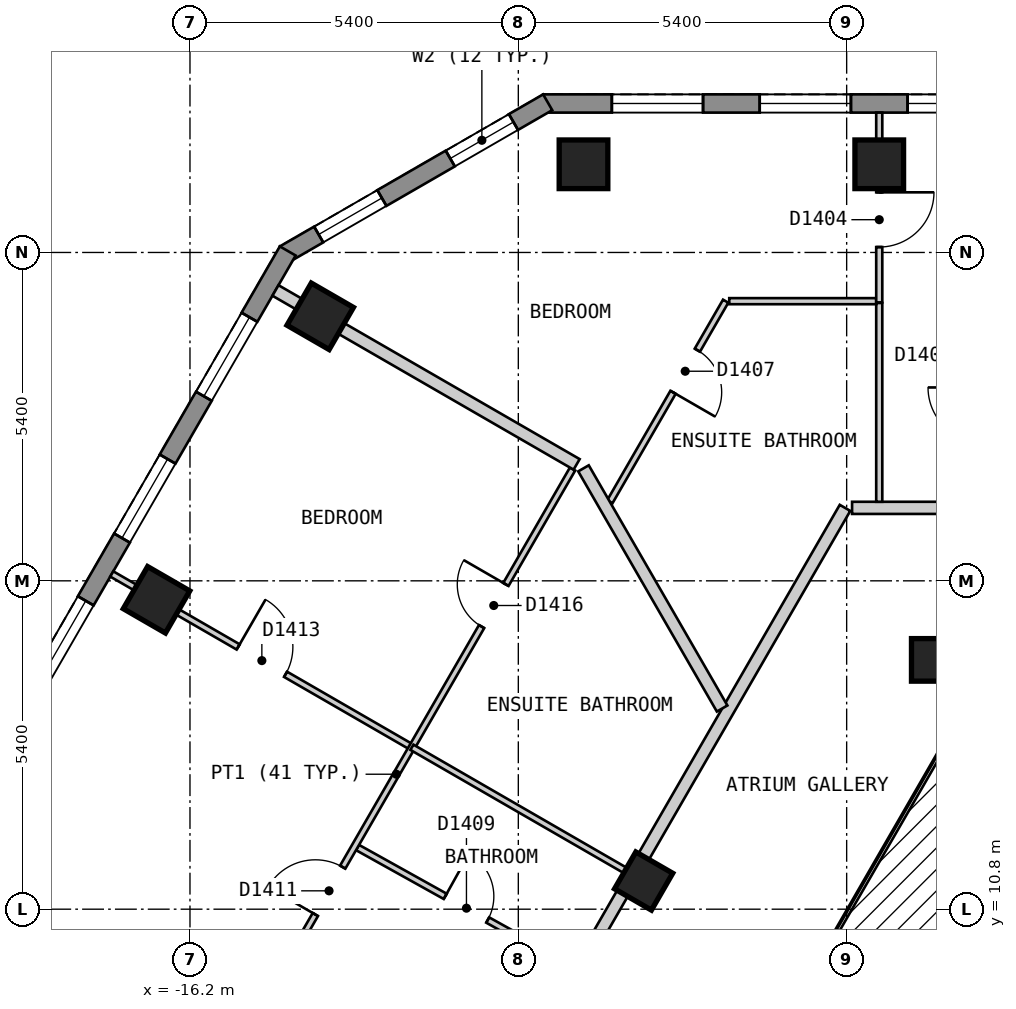
"""IFC4 building model, lengths in metres.
Left out: names, types, materials, properties, quantities, classifications, styles, units other than length and angle.
Written with IfcOpenShell. Run it as: python <this file> out.ifc"""

import sys

from ifc_helpers import new_model, si_unit, direction, frame, frame_2d, origin, origin_2d, place, context, subcontext, project, spatial, polyline, rectangle, outline, extrude, element, fill, save


model = new_model("IFC4")
c1 = context("Model", 3, precision=1e-05, world=origin(), true_north=direction((0.0, 1.0)))
c2 = subcontext(c1, "Body", "Model", "MODEL_VIEW")
j1 = project(units=[si_unit("LENGTHUNIT", "METRE"), si_unit("PLANEANGLEUNIT", "RADIAN")], contexts=[c1])
p1 = place(None, origin())
s1 = spatial("IfcSite", under=j1, at=p1, CompositionType="ELEMENT")
p2 = place(p1, origin())
s2 = spatial("IfcBuilding", under=s1, at=p2, CompositionType="ELEMENT")
p3 = place(p2, frame((0.0, 0.0, 178.2)))
s3 = spatial("IfcBuildingStorey", under=s2, at=p3, CompositionType="ELEMENT", Elevation=178.2)
for number, where, z_axis, x_axis in (
    (1, (-4.864, 23.05, 0.0), (0.0, 0.0, 1.0), (-1.0, 0.0, 0.0)),
    (2, (-9.728, 23.05, 0.0), (0.0, 0.0, 1.0), (-1.0, 0.0, 0.0)),
    (3, (-14.058, 20.55, 0.0), (0.0, 0.0, 1.0), (-0.5, -0.866, 0.0)),
    (4, (-16.75, 15.888, 0.0), (0.0, 0.0, 1.0), (-0.5, -0.866, 0.0)),
):
    element("IfcColumn", number, at=place(p3, frame(where, z_axis=z_axis, x_axis=x_axis)), inside=s3, PredefinedType="COLUMN", context=c2, shape_type="SweptSolid", body=[
        extrude(rectangle(XDim=0.8, YDim=0.8, at=origin_2d()), origin(), (0.0, 0.0, 1.0), 3.0),
    ])
for number, where, z_axis, x_axis in (
    (5, (-3.984, 14.9, 0.0), (0.0, 0.0, 1.0), (1.0, 0.0, 0.0)),
    (6, (-8.739, 11.263, 0.0), (0.0, 0.0, 1.0), (-0.5, -0.866, 0.0)),
):
    element("IfcColumn", number, at=place(p3, frame(where, z_axis=z_axis, x_axis=x_axis)), inside=s3, PredefinedType="COLUMN", context=c2, shape_type="SweptSolid", body=[
        extrude(rectangle(XDim=0.7, YDim=0.7, at=origin_2d()), origin(), (0.0, 0.0, 1.0), 3.0),
    ])
p4 = place(p3, frame((10.392, 24.05, 0.0), z_axis=(0.0, 0.0, 1.0), x_axis=(-1.0, 0.0, 0.0)))
e7 = element("IfcWall", 7, at=p4, inside=s3, PredefinedType="SOLIDWALL", context=c2, shape_type="SweptSolid", body=[
    extrude(outline(polyline([(0.0, -0.15), (20.784, -0.15), (20.704, 0.15), (0.08, 0.15), (0.0, -0.15)])), origin(), (0.0, 0.0, 1.0), 2.7),
])
p5 = place(p4, frame((1.13, 0.0, 0.15)))
e8 = element("IfcOpeningElement", 8, at=p5, cuts=e7, PredefinedType="OPENING", context=c2, shape_type="SweptSolid", body=[
    extrude(rectangle(XDim=1.5, YDim=2.1, at=frame_2d((0.75, 1.05))), frame((0.0, 0.16, 0.0), z_axis=(0.0, -1.0, 0.0), x_axis=(1.0, 0.0, 0.0)), (0.0, 0.0, 1.0), 0.32),
])
p6 = place(p4, frame((3.562, 0.0, 0.15)))
e9 = element("IfcOpeningElement", 9, at=p6, cuts=e7, PredefinedType="OPENING", context=c2, shape_type="SweptSolid", body=[
    extrude(rectangle(XDim=1.5, YDim=2.1, at=frame_2d((0.75, 1.05))), frame((0.0, 0.16, 0.0), z_axis=(0.0, -1.0, 0.0), x_axis=(1.0, 0.0, 0.0)), (0.0, 0.0, 1.0), 0.32),
])
p7 = place(p4, frame((5.994, 0.0, 0.15)))
e10 = element("IfcOpeningElement", 10, at=p7, cuts=e7, PredefinedType="OPENING", context=c2, shape_type="SweptSolid", body=[
    extrude(rectangle(XDim=1.5, YDim=2.1, at=frame_2d((0.75, 1.05))), frame((0.0, 0.16, 0.0), z_axis=(0.0, -1.0, 0.0), x_axis=(1.0, 0.0, 0.0)), (0.0, 0.0, 1.0), 0.32),
])
p8 = place(p4, frame((8.426, 0.0, 0.15)))
e11 = element("IfcOpeningElement", 11, at=p8, cuts=e7, PredefinedType="OPENING", context=c2, shape_type="SweptSolid", body=[
    extrude(rectangle(XDim=1.5, YDim=2.1, at=frame_2d((0.75, 1.05))), frame((0.0, 0.16, 0.0), z_axis=(0.0, -1.0, 0.0), x_axis=(1.0, 0.0, 0.0)), (0.0, 0.0, 1.0), 0.32),
])
p9 = place(p4, frame((10.858, 0.0, 0.15)))
e12 = element("IfcOpeningElement", 12, at=p9, cuts=e7, PredefinedType="OPENING", context=c2, shape_type="SweptSolid", body=[
    extrude(rectangle(XDim=1.5, YDim=2.1, at=frame_2d((0.75, 1.05))), frame((0.0, 0.16, 0.0), z_axis=(0.0, -1.0, 0.0), x_axis=(1.0, 0.0, 0.0)), (0.0, 0.0, 1.0), 0.32),
])
p10 = place(p4, frame((13.29, 0.0, 0.15)))
e13 = element("IfcOpeningElement", 13, at=p10, cuts=e7, PredefinedType="OPENING", context=c2, shape_type="SweptSolid", body=[
    extrude(rectangle(XDim=1.5, YDim=2.1, at=frame_2d((0.75, 1.05))), frame((0.0, 0.16, 0.0), z_axis=(0.0, -1.0, 0.0), x_axis=(1.0, 0.0, 0.0)), (0.0, 0.0, 1.0), 0.32),
])
p11 = place(p4, frame((15.722, 0.0, 0.15)))
e14 = element("IfcOpeningElement", 14, at=p11, cuts=e7, PredefinedType="OPENING", context=c2, shape_type="SweptSolid", body=[
    extrude(rectangle(XDim=1.5, YDim=2.1, at=frame_2d((0.75, 1.05))), frame((0.0, 0.16, 0.0), z_axis=(0.0, -1.0, 0.0), x_axis=(1.0, 0.0, 0.0)), (0.0, 0.0, 1.0), 0.32),
])
p12 = place(p4, frame((18.154, 0.0, 0.15)))
e15 = element("IfcOpeningElement", 15, at=p12, cuts=e7, PredefinedType="OPENING", context=c2, shape_type="SweptSolid", body=[
    extrude(rectangle(XDim=1.5, YDim=2.1, at=frame_2d((0.75, 1.05))), frame((0.0, 0.16, 0.0), z_axis=(0.0, -1.0, 0.0), x_axis=(1.0, 0.0, 0.0)), (0.0, 0.0, 1.0), 0.32),
])
p13 = place(p3, frame((-10.317, 24.07, 0.0), z_axis=(0.0, 0.0, 1.0), x_axis=(-0.866022959057, -0.500004234368, 0.0)))
e16 = element("IfcWall", 16, at=p13, inside=s3, PredefinedType="SOLIDWALL", context=c2, shape_type="SweptSolid", body=[
    extrude(outline(polyline([(0.0, -0.15), (5.0, -0.15), (4.92, 0.15), (0.08, 0.15), (0.0, -0.15)])), origin(), (0.0, 0.0, 1.0), 2.7),
])
p14 = place(p13, frame((0.65, 0.0, 0.15)))
e17 = element("IfcOpeningElement", 17, at=p14, cuts=e16, PredefinedType="OPENING", context=c2, shape_type="SweptSolid", body=[
    extrude(rectangle(XDim=1.2, YDim=2.1, at=frame_2d((0.6, 1.05))), frame((0.0, 0.16, 0.0), z_axis=(0.0, -1.0, 0.0), x_axis=(1.0, 0.0, 0.0)), (0.0, 0.0, 1.0), 0.32),
])
p15 = place(p13, frame((3.149, 0.0, 0.15)))
e18 = element("IfcOpeningElement", 18, at=p15, cuts=e16, PredefinedType="OPENING", context=c2, shape_type="SweptSolid", body=[
    extrude(rectangle(XDim=1.2, YDim=2.1, at=frame_2d((0.6, 1.05))), frame((0.0, 0.16, 0.0), z_axis=(0.0, -1.0, 0.0), x_axis=(1.0, 0.0, 0.0)), (0.0, 0.0, 1.0), 0.32),
])
p16 = place(p3, frame((-14.592, 21.625, 0.0), z_axis=(0.0, 0.0, 1.0), x_axis=(-0.500010537973, -0.866019319597, 0.0)))
e19 = element("IfcWall", 19, at=p16, inside=s3, PredefinedType="SOLIDWALL", context=c2, shape_type="SweptSolid", body=[
    extrude(outline(polyline([(0.0, -0.15), (22.863, -0.15), (22.783, 0.15), (0.08, 0.15), (0.0, -0.15)])), origin(), (0.0, 0.0, 1.0), 2.7),
])
p17 = place(p16, frame((1.259, 0.0, 0.15)))
e20 = element("IfcOpeningElement", 20, at=p17, cuts=e19, PredefinedType="OPENING", context=c2, shape_type="SweptSolid", body=[
    extrude(rectangle(XDim=1.5, YDim=2.1, at=frame_2d((0.75, 1.05))), frame((0.0, 0.16, 0.0), z_axis=(0.0, -1.0, 0.0), x_axis=(1.0, 0.0, 0.0)), (0.0, 0.0, 1.0), 0.32),
])
p18 = place(p16, frame((3.952, 0.0, 0.15)))
e21 = element("IfcOpeningElement", 21, at=p18, cuts=e19, PredefinedType="OPENING", context=c2, shape_type="SweptSolid", body=[
    extrude(rectangle(XDim=1.5, YDim=2.1, at=frame_2d((0.75, 1.05))), frame((0.0, 0.16, 0.0), z_axis=(0.0, -1.0, 0.0), x_axis=(1.0, 0.0, 0.0)), (0.0, 0.0, 1.0), 0.32),
])
p19 = place(p16, frame((6.644, 0.0, 0.15)))
e22 = element("IfcOpeningElement", 22, at=p19, cuts=e19, PredefinedType="OPENING", context=c2, shape_type="SweptSolid", body=[
    extrude(rectangle(XDim=1.5, YDim=2.1, at=frame_2d((0.75, 1.05))), frame((0.0, 0.16, 0.0), z_axis=(0.0, -1.0, 0.0), x_axis=(1.0, 0.0, 0.0)), (0.0, 0.0, 1.0), 0.32),
])
p20 = place(p16, frame((9.335, 0.0, 0.15)))
e23 = element("IfcOpeningElement", 23, at=p20, cuts=e19, PredefinedType="OPENING", context=c2, shape_type="SweptSolid", body=[
    extrude(rectangle(XDim=1.5, YDim=2.1, at=frame_2d((0.75, 1.05))), frame((0.0, 0.16, 0.0), z_axis=(0.0, -1.0, 0.0), x_axis=(1.0, 0.0, 0.0)), (0.0, 0.0, 1.0), 0.32),
])
p21 = place(p16, frame((12.028, 0.0, 0.15)))
e24 = element("IfcOpeningElement", 24, at=p21, cuts=e19, PredefinedType="OPENING", context=c2, shape_type="SweptSolid", body=[
    extrude(rectangle(XDim=1.5, YDim=2.1, at=frame_2d((0.75, 1.05))), frame((0.0, 0.16, 0.0), z_axis=(0.0, -1.0, 0.0), x_axis=(1.0, 0.0, 0.0)), (0.0, 0.0, 1.0), 0.32),
])
p22 = place(p16, frame((14.72, 0.0, 0.15)))
e25 = element("IfcOpeningElement", 25, at=p22, cuts=e19, PredefinedType="OPENING", context=c2, shape_type="SweptSolid", body=[
    extrude(rectangle(XDim=1.5, YDim=2.1, at=frame_2d((0.75, 1.05))), frame((0.0, 0.16, 0.0), z_axis=(0.0, -1.0, 0.0), x_axis=(1.0, 0.0, 0.0)), (0.0, 0.0, 1.0), 0.32),
])
p23 = place(p16, frame((17.411, 0.0, 0.15)))
e26 = element("IfcOpeningElement", 26, at=p23, cuts=e19, PredefinedType="OPENING", context=c2, shape_type="SweptSolid", body=[
    extrude(rectangle(XDim=1.5, YDim=2.1, at=frame_2d((0.75, 1.05))), frame((0.0, 0.16, 0.0), z_axis=(0.0, -1.0, 0.0), x_axis=(1.0, 0.0, 0.0)), (0.0, 0.0, 1.0), 0.32),
])
p24 = place(p16, frame((20.104, 0.0, 0.15)))
e27 = element("IfcOpeningElement", 27, at=p24, cuts=e19, PredefinedType="OPENING", context=c2, shape_type="SweptSolid", body=[
    extrude(rectangle(XDim=1.5, YDim=2.1, at=frame_2d((0.75, 1.05))), frame((0.0, 0.16, 0.0), z_axis=(0.0, -1.0, 0.0), x_axis=(1.0, 0.0, 0.0)), (0.0, 0.0, 1.0), 0.32),
])
p25 = place(p3, frame((-5.311, 17.4, 0.0), z_axis=(0.0, 0.0, 1.0), x_axis=(1.0, 0.0, 0.0)))
e28 = element("IfcWall", 28, at=p25, inside=s3, PredefinedType="PARTITIONING", context=c2, shape_type="SweptSolid", body=[
    extrude(rectangle(XDim=10.075, YDim=0.2, at=frame_2d((5.038, 0.0))), origin(), (0.0, 0.0, 1.0), 2.7),
])
p26 = place(p25, frame((2.429, 0.0, 0.0)))
e29 = element("IfcOpeningElement", 29, at=p26, cuts=e28, PredefinedType="OPENING", context=c2, shape_type="SweptSolid", body=[
    extrude(rectangle(XDim=0.9, YDim=2.1, at=frame_2d((0.45, 1.05))), frame((0.0, 0.11, 0.0), z_axis=(0.0, -1.0, 0.0), x_axis=(1.0, 0.0, 0.0)), (0.0, 0.0, 1.0), 0.22),
])
p27 = place(p3, frame((-10.854, 8.0, 0.0), z_axis=(0.0, 0.0, 1.0), x_axis=(0.499997637144, 0.866026767976, 0.0)))
e30 = element("IfcWall", 30, at=p27, inside=s3, PredefinedType="PARTITIONING", context=c2, shape_type="SweptSolid", body=[
    extrude(rectangle(XDim=10.854, YDim=0.2, at=frame_2d((5.427, 0.0))), origin(), (0.0, 0.0, 1.0), 2.7),
])
p28 = place(p27, frame((0.721, 0.0, 0.0)))
e31 = element("IfcOpeningElement", 31, at=p28, cuts=e30, PredefinedType="OPENING", context=c2, shape_type="SweptSolid", body=[
    extrude(rectangle(XDim=1.0, YDim=2.1, at=frame_2d((0.5, 1.05))), frame((0.0, 0.11, 0.0), z_axis=(0.0, -1.0, 0.0), x_axis=(1.0, 0.0, 0.0)), (0.0, 0.0, 1.0), 0.22),
])
p29 = place(p3, frame((-4.864, 20.769, 0.0), z_axis=(0.0, 0.0, 1.0), x_axis=(0.0, -1.0, 0.0)))
e32 = element("IfcWall", 32, at=p29, inside=s3, PredefinedType="PARTITIONING", context=c2, shape_type="SweptSolid", body=[
    extrude(rectangle(XDim=3.269, YDim=0.1, at=frame_2d((1.635, 0.0))), origin(), (0.0, 0.0, 1.0), 2.7),
])
p30 = place(p3, frame((-13.444, 11.814, 0.0), z_axis=(0.0, 0.0, 1.0), x_axis=(0.873653620945, -0.486548405207, 0.0)))
e33 = element("IfcWall", 33, at=p30, inside=s3, PredefinedType="PARTITIONING", context=c2, shape_type="SweptSolid", body=[
    extrude(rectangle(XDim=4.051, YDim=0.1, at=frame_2d((2.025, 0.0))), origin(), (0.0, 0.0, 1.0), 2.7),
])
p31 = place(p30, frame((1.65, 0.0, 0.0)))
e34 = element("IfcOpeningElement", 34, at=p31, cuts=e33, PredefinedType="OPENING", context=c2, shape_type="SweptSolid", body=[
    extrude(rectangle(XDim=0.8, YDim=2.1, at=frame_2d((0.4, 1.05))), frame((0.0, 0.06, 0.0), z_axis=(0.0, -1.0, 0.0), x_axis=(1.0, 0.0, 0.0)), (0.0, 0.0, 1.0), 0.12),
])
p32 = place(p3, frame((-17.486, 16.313, 0.0), z_axis=(0.0, 0.0, 1.0), x_axis=(0.866004402611, -0.500036373335, 0.0)))
e35 = element("IfcWall", 35, at=p32, inside=s3, PredefinedType="PARTITIONING", context=c2, shape_type="SweptSolid", body=[
    extrude(rectangle(XDim=5.7, YDim=0.1, at=frame_2d((2.85, 0.0))), origin(), (0.0, 0.0, 1.0), 2.7),
])
p33 = place(p32, frame((2.4, 0.0, 0.0)))
e36 = element("IfcOpeningElement", 36, at=p33, cuts=e35, PredefinedType="OPENING", context=c2, shape_type="SweptSolid", body=[
    extrude(rectangle(XDim=0.9, YDim=2.1, at=frame_2d((0.45, 1.05))), frame((0.0, 0.06, 0.0), z_axis=(0.0, -1.0, 0.0), x_axis=(1.0, 0.0, 0.0)), (0.0, 0.0, 1.0), 0.12),
])
p34 = place(p3, frame((-7.331, 20.799, 0.0), z_axis=(0.0, 0.0, 1.0), x_axis=(1.0, 0.0, 0.0)))
e37 = element("IfcWall", 37, at=p34, inside=s3, PredefinedType="PARTITIONING", context=c2, shape_type="SweptSolid", body=[
    extrude(rectangle(XDim=2.417, YDim=0.1, at=frame_2d((1.208, 0.0))), origin(), (0.0, 0.0, 1.0), 2.7),
])
p35 = place(p3, frame((-9.295, 17.5, 0.0), z_axis=(0.0, 0.0, 1.0), x_axis=(0.500060839138, 0.865990275442, 0.0)))
e38 = element("IfcWall", 38, at=p35, inside=s3, PredefinedType="PARTITIONING", context=c2, shape_type="SweptSolid", body=[
    extrude(rectangle(XDim=3.81, YDim=0.1, at=frame_2d((1.905, 0.0))), origin(), (0.0, 0.0, 1.0), 2.7),
])
p36 = place(p35, frame((2.079, 0.0, 0.0)))
e39 = element("IfcOpeningElement", 39, at=p36, cuts=e38, PredefinedType="OPENING", context=c2, shape_type="SweptSolid", body=[
    extrude(rectangle(XDim=0.8, YDim=2.1, at=frame_2d((0.4, 1.05))), frame((0.0, 0.06, 0.0), z_axis=(0.0, -1.0, 0.0), x_axis=(1.0, 0.0, 0.0)), (0.0, 0.0, 1.0), 0.12),
])
p37 = place(p3, frame((-15.704, 8.0, 0.0), z_axis=(0.0, 0.0, 1.0), x_axis=(0.500005637941, 0.866022148693, 0.0)))
e40 = element("IfcWall", 40, at=p37, inside=s3, PredefinedType="PARTITIONING", context=c2, shape_type="SweptSolid", body=[
    extrude(rectangle(XDim=11.592, YDim=0.1, at=frame_2d((5.796, 0.0))), origin(), (0.0, 0.0, 1.0), 2.7),
])
p38 = place(p37, frame((3.132, 0.0, 0.0)))
e41 = element("IfcOpeningElement", 41, at=p38, cuts=e40, PredefinedType="OPENING", context=c2, shape_type="SweptSolid", body=[
    extrude(rectangle(XDim=0.9, YDim=2.1, at=frame_2d((0.45, 1.05))), frame((0.0, 0.06, 0.0), z_axis=(0.0, -1.0, 0.0), x_axis=(1.0, 0.0, 0.0)), (0.0, 0.0, 1.0), 0.12),
])
p39 = place(p37, frame((8.6, 0.0, 0.0)))
e42 = element("IfcOpeningElement", 42, at=p39, cuts=e40, PredefinedType="OPENING", context=c2, shape_type="SweptSolid", body=[
    extrude(rectangle(XDim=0.8, YDim=2.1, at=frame_2d((0.4, 1.05))), frame((0.0, 0.06, 0.0), z_axis=(0.0, -1.0, 0.0), x_axis=(1.0, 0.0, 0.0)), (0.0, 0.0, 1.0), 0.12),
])
p40 = place(p3, frame((-4.864, 20.779, 0.0), z_axis=(0.0, 0.0, 1.0), x_axis=(0.0, 1.0, 0.0)))
e43 = element("IfcWall", 43, at=p40, inside=s3, PredefinedType="PARTITIONING", context=c2, shape_type="SweptSolid", body=[
    extrude(rectangle(XDim=3.121, YDim=0.1, at=frame_2d((1.561, 0.0))), origin(), (0.0, 0.0, 1.0), 2.7),
])
p41 = place(p40, frame((0.91, 0.0, 0.0)))
e44 = element("IfcOpeningElement", 44, at=p41, cuts=e43, PredefinedType="OPENING", context=c2, shape_type="SweptSolid", body=[
    extrude(rectangle(XDim=0.9, YDim=2.1, at=frame_2d((0.45, 1.05))), frame((0.0, 0.06, 0.0), z_axis=(0.0, -1.0, 0.0), x_axis=(1.0, 0.0, 0.0)), (0.0, 0.0, 1.0), 0.12),
])
p42 = place(p3, frame((-9.728, 18.05, 0.0), z_axis=(0.0, 0.0, 1.0), x_axis=(0.499921709333, -0.866070600204, 0.0)))
e45 = element("IfcWall", 45, at=p42, inside=s3, PredefinedType="PARTITIONING", context=c2, shape_type="SweptSolid", body=[
    extrude(rectangle(XDim=4.561, YDim=0.2, at=frame_2d((2.28, 0.0))), origin(), (0.0, 0.0, 1.0), 2.7),
])
p43 = place(p3, frame((-14.794, 20.975, 0.0), z_axis=(0.0, 0.0, 1.0), x_axis=(0.865982978614, -0.500073475352, 0.0)))
e46 = element("IfcWall", 46, at=p43, inside=s3, PredefinedType="PARTITIONING", context=c2, shape_type="SweptSolid", body=[
    extrude(rectangle(XDim=5.719, YDim=0.2, at=frame_2d((2.86, 0.0))), origin(), (0.0, 0.0, 1.0), 2.7),
])
p44 = place(p3, frame((-12.55, 13.463, 0.0), z_axis=(0.0, 0.0, 1.0), x_axis=(0.86606561423, -0.499930346997, 0.0)))
e47 = element("IfcWall", 47, at=p44, inside=s3, PredefinedType="PARTITIONING", context=c2, shape_type="SweptSolid", body=[
    extrude(rectangle(XDim=4.1, YDim=0.1, at=frame_2d((2.05, 0.0))), origin(), (0.0, 0.0, 1.0), 2.7),
])
p45 = place(p10, origin())
e48 = element("IfcWindow", 48, at=p45, inside=s3, PartitioningType="SINGLE_PANEL", PredefinedType="WINDOW", context=c2, shape_type="SweptSolid", body=[
    extrude(rectangle(XDim=1.5, YDim=2.1, at=frame_2d((0.75, 1.05))), frame((0.0, 0.03, 0.0), z_axis=(0.0, -1.0, 0.0), x_axis=(1.0, 0.0, 0.0)), (0.0, 0.0, 1.0), 0.06),
])
fill(e13, e48)
p46 = place(p11, origin())
e49 = element("IfcWindow", 49, at=p46, inside=s3, PartitioningType="SINGLE_PANEL", PredefinedType="WINDOW", context=c2, shape_type="SweptSolid", body=[
    extrude(rectangle(XDim=1.5, YDim=2.1, at=frame_2d((0.75, 1.05))), frame((0.0, 0.03, 0.0), z_axis=(0.0, -1.0, 0.0), x_axis=(1.0, 0.0, 0.0)), (0.0, 0.0, 1.0), 0.06),
])
fill(e14, e49)
p47 = place(p12, origin())
e50 = element("IfcWindow", 50, at=p47, inside=s3, PartitioningType="SINGLE_PANEL", PredefinedType="WINDOW", context=c2, shape_type="SweptSolid", body=[
    extrude(rectangle(XDim=1.5, YDim=2.1, at=frame_2d((0.75, 1.05))), frame((0.0, 0.03, 0.0), z_axis=(0.0, -1.0, 0.0), x_axis=(1.0, 0.0, 0.0)), (0.0, 0.0, 1.0), 0.06),
])
fill(e15, e50)
p48 = place(p14, origin())
e51 = element("IfcWindow", 51, at=p48, inside=s3, PartitioningType="SINGLE_PANEL", PredefinedType="WINDOW", context=c2, shape_type="SweptSolid", body=[
    extrude(rectangle(XDim=1.2, YDim=2.1, at=frame_2d((0.6, 1.05))), frame((0.0, 0.03, 0.0), z_axis=(0.0, -1.0, 0.0), x_axis=(1.0, 0.0, 0.0)), (0.0, 0.0, 1.0), 0.06),
])
fill(e17, e51)
p49 = place(p15, origin())
e52 = element("IfcWindow", 52, at=p49, inside=s3, PartitioningType="SINGLE_PANEL", PredefinedType="WINDOW", context=c2, shape_type="SweptSolid", body=[
    extrude(rectangle(XDim=1.2, YDim=2.1, at=frame_2d((0.6, 1.05))), frame((0.0, 0.03, 0.0), z_axis=(0.0, -1.0, 0.0), x_axis=(1.0, 0.0, 0.0)), (0.0, 0.0, 1.0), 0.06),
])
fill(e18, e52)
p50 = place(p17, origin())
e53 = element("IfcWindow", 53, at=p50, inside=s3, PartitioningType="SINGLE_PANEL", PredefinedType="WINDOW", context=c2, shape_type="SweptSolid", body=[
    extrude(rectangle(XDim=1.5, YDim=2.1, at=frame_2d((0.75, 1.05))), frame((0.0, 0.03, 0.0), z_axis=(0.0, -1.0, 0.0), x_axis=(1.0, 0.0, 0.0)), (0.0, 0.0, 1.0), 0.06),
])
fill(e20, e53)
p51 = place(p18, origin())
e54 = element("IfcWindow", 54, at=p51, inside=s3, PartitioningType="SINGLE_PANEL", PredefinedType="WINDOW", context=c2, shape_type="SweptSolid", body=[
    extrude(rectangle(XDim=1.5, YDim=2.1, at=frame_2d((0.75, 1.05))), frame((0.0, 0.03, 0.0), z_axis=(0.0, -1.0, 0.0), x_axis=(1.0, 0.0, 0.0)), (0.0, 0.0, 1.0), 0.06),
])
fill(e21, e54)
p52 = place(p19, origin())
e55 = element("IfcWindow", 55, at=p52, inside=s3, PartitioningType="SINGLE_PANEL", PredefinedType="WINDOW", context=c2, shape_type="SweptSolid", body=[
    extrude(rectangle(XDim=1.5, YDim=2.1, at=frame_2d((0.75, 1.05))), frame((0.0, 0.03, 0.0), z_axis=(0.0, -1.0, 0.0), x_axis=(1.0, 0.0, 0.0)), (0.0, 0.0, 1.0), 0.06),
])
fill(e22, e55)
p53 = place(p41, origin())
e56 = element("IfcDoor", 56, at=p53, inside=s3, OperationType="SINGLE_SWING_RIGHT", PredefinedType="DOOR", context=c2, shape_type="SweptSolid", body=[
    extrude(rectangle(XDim=0.9, YDim=2.1, at=frame_2d((0.45, 1.05))), frame((0.0, 0.025, 0.0), z_axis=(0.0, -1.0, 0.0), x_axis=(1.0, 0.0, 0.0)), (0.0, 0.0, 1.0), 0.05),
])
fill(e44, e56)
p54 = place(p36, origin())
e57 = element("IfcDoor", 57, at=p54, inside=s3, OperationType="SINGLE_SWING_LEFT", PredefinedType="DOOR", context=c2, shape_type="SweptSolid", body=[
    extrude(rectangle(XDim=0.8, YDim=2.1, at=frame_2d((0.4, 1.05))), frame((0.0, 0.025, 0.0), z_axis=(0.0, -1.0, 0.0), x_axis=(1.0, 0.0, 0.0)), (0.0, 0.0, 1.0), 0.05),
])
fill(e39, e57)
p55 = place(p31, origin())
e58 = element("IfcDoor", 58, at=p55, inside=s3, OperationType="SINGLE_SWING_LEFT", PredefinedType="DOOR", context=c2, shape_type="SweptSolid", body=[
    extrude(rectangle(XDim=0.8, YDim=2.1, at=frame_2d((0.4, 1.05))), frame((0.0, 0.025, 0.0), z_axis=(0.0, -1.0, 0.0), x_axis=(1.0, 0.0, 0.0)), (0.0, 0.0, 1.0), 0.05),
])
fill(e34, e58)
p56 = place(p38, origin())
e59 = element("IfcDoor", 59, at=p56, inside=s3, OperationType="SINGLE_SWING_LEFT", PredefinedType="DOOR", context=c2, shape_type="SweptSolid", body=[
    extrude(rectangle(XDim=0.9, YDim=2.1, at=frame_2d((0.45, 1.05))), frame((0.0, 0.025, 0.0), z_axis=(0.0, -1.0, 0.0), x_axis=(1.0, 0.0, 0.0)), (0.0, 0.0, 1.0), 0.05),
])
fill(e41, e59)
p57 = place(p33, origin())
e60 = element("IfcDoor", 60, at=p57, inside=s3, OperationType="SINGLE_SWING_LEFT", PredefinedType="DOOR", context=c2, shape_type="SweptSolid", body=[
    extrude(rectangle(XDim=0.9, YDim=2.1, at=frame_2d((0.45, 1.05))), frame((0.0, 0.025, 0.0), z_axis=(0.0, -1.0, 0.0), x_axis=(1.0, 0.0, 0.0)), (0.0, 0.0, 1.0), 0.05),
])
fill(e36, e60)
p58 = place(p39, origin())
e61 = element("IfcDoor", 61, at=p58, inside=s3, OperationType="SINGLE_SWING_RIGHT", PredefinedType="DOOR", context=c2, shape_type="SweptSolid", body=[
    extrude(rectangle(XDim=0.8, YDim=2.1, at=frame_2d((0.4, 1.05))), frame((0.0, 0.025, 0.0), z_axis=(0.0, -1.0, 0.0), x_axis=(1.0, 0.0, 0.0)), (0.0, 0.0, 1.0), 0.05),
])
fill(e42, e61)
save(model, sys.argv[1])
